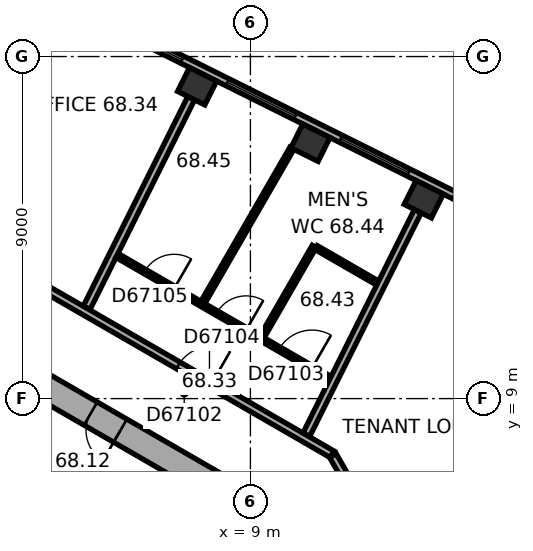
"""IFC4 building model, lengths in metres.
Left out: names, types, materials, properties, quantities, classifications, styles, units other than length and angle.
Written with IfcOpenShell. Run it as: python <this file> out.ifc"""

import sys

from ifc_helpers import new_model, si_unit, direction, frame, frame_2d, origin, origin_2d, place, context, subcontext, project, spatial, rectangle, extrude, element, fill, save


model = new_model("IFC4")
c1 = context("Model", 3, precision=1e-05, world=origin(), true_north=direction((0.0, 1.0)))
c2 = subcontext(c1, "Body", "Model", "MODEL_VIEW")
j1 = project(units=[si_unit("LENGTHUNIT", "METRE"), si_unit("PLANEANGLEUNIT", "RADIAN")], contexts=[c1])
p1 = place(None, origin())
s1 = spatial("IfcSite", under=j1, at=p1, CompositionType="ELEMENT")
p2 = place(p1, origin())
s2 = spatial("IfcBuilding", under=s1, at=p2, CompositionType="ELEMENT")
p3 = place(p2, frame((0.0, 0.0, 274.6)))
s3 = spatial("IfcBuildingStorey", under=s2, at=p3, CompositionType="ELEMENT", Elevation=274.6)
for number, where, z_axis, x_axis in (
    (1, (13.561, 14.246, 0.0), (0.0, 0.0, 1.0), (-0.895, 0.446, 0.0)),
    (2, (10.58, 15.732, 0.0), (0.0, 0.0, 1.0), (-0.895, 0.446, 0.0)),
    (3, (7.598, 17.219, 0.0), (0.0, 0.0, 1.0), (-0.895, 0.446, 0.0)),
):
    element("IfcColumn", number, at=place(p3, frame(where, z_axis=z_axis, x_axis=x_axis)), inside=s3, PredefinedType="COLUMN", context=c2, shape_type="SweptSolid", body=[
        extrude(rectangle(XDim=0.8, YDim=0.7, at=origin_2d()), origin(), (0.0, 0.0, 1.0), 3.7),
    ])
p4 = place(p3, frame((10.025, 5.586, 0.0), z_axis=(0.0, 0.0, 1.0), x_axis=(-0.866026453023, 0.499998182661, 0.0)))
e4 = element("IfcWall", 4, at=p4, inside=s3, PredefinedType="SHEAR", context=c2, shape_type="SweptSolid", body=[
    extrude(rectangle(XDim=11.778, YDim=0.7, at=frame_2d((5.889, 0.0))), origin(), (0.0, 0.0, 1.0), 3.7),
])
p5 = place(p4, frame((5.139, 0.0, 0.0)))
e5 = element("IfcOpeningElement", 5, at=p5, cuts=e4, PredefinedType="OPENING", context=c2, shape_type="SweptSolid", body=[
    extrude(rectangle(XDim=0.9, YDim=2.1, at=frame_2d((0.45, 1.05))), frame((0.0, 0.36, 0.0), z_axis=(0.0, -1.0, 0.0), x_axis=(1.0, 0.0, 0.0)), (0.0, 0.0, 1.0), 0.72),
])
p6 = place(p3, frame((17.223, 12.923, 0.0), z_axis=(0.0, 0.0, 1.0), x_axis=(-0.894930561148, 0.44620543556, 0.0)))
e6 = element("IfcWall", 6, at=p6, inside=s3, PredefinedType="STANDARD", context=c2, shape_type="SweptSolid", body=[
    extrude(rectangle(XDim=17.731, YDim=0.2, at=frame_2d((8.866, 0.0))), origin(), (0.0, 0.0, 1.0), 3.7),
])
p7 = place(p6, frame((1.202, 0.0, 0.9)))
e7 = element("IfcOpeningElement", 7, at=p7, cuts=e6, PredefinedType="OPENING", context=c2, shape_type="SweptSolid", body=[
    extrude(rectangle(XDim=2.0, YDim=2.0, at=frame_2d((1.0, 1.0))), frame((0.0, 0.11, 0.0), z_axis=(0.0, -1.0, 0.0), x_axis=(1.0, 0.0, 0.0)), (0.0, 0.0, 1.0), 0.22),
])
p8 = place(p6, frame((4.533, 0.0, 0.9)))
e8 = element("IfcOpeningElement", 8, at=p8, cuts=e6, PredefinedType="OPENING", context=c2, shape_type="SweptSolid", body=[
    extrude(rectangle(XDim=2.0, YDim=2.0, at=frame_2d((1.0, 1.0))), frame((0.0, 0.11, 0.0), z_axis=(0.0, -1.0, 0.0), x_axis=(1.0, 0.0, 0.0)), (0.0, 0.0, 1.0), 0.22),
])
p9 = place(p6, frame((7.865, 0.0, 0.9)))
e9 = element("IfcOpeningElement", 9, at=p9, cuts=e6, PredefinedType="OPENING", context=c2, shape_type="SweptSolid", body=[
    extrude(rectangle(XDim=2.0, YDim=2.0, at=frame_2d((1.0, 1.0))), frame((0.0, 0.11, 0.0), z_axis=(0.0, -1.0, 0.0), x_axis=(1.0, 0.0, 0.0)), (0.0, 0.0, 1.0), 0.22),
])
p10 = place(p6, frame((11.197, 0.0, 0.9)))
e10 = element("IfcOpeningElement", 10, at=p10, cuts=e6, PredefinedType="OPENING", context=c2, shape_type="SweptSolid", body=[
    extrude(rectangle(XDim=2.0, YDim=2.0, at=frame_2d((1.0, 1.0))), frame((0.0, 0.11, 0.0), z_axis=(0.0, -1.0, 0.0), x_axis=(1.0, 0.0, 0.0)), (0.0, 0.0, 1.0), 0.22),
])
p11 = place(p6, frame((14.528, 0.0, 0.9)))
e11 = element("IfcOpeningElement", 11, at=p11, cuts=e6, PredefinedType="OPENING", context=c2, shape_type="SweptSolid", body=[
    extrude(rectangle(XDim=2.0, YDim=2.0, at=frame_2d((1.0, 1.0))), frame((0.0, 0.11, 0.0), z_axis=(0.0, -1.0, 0.0), x_axis=(1.0, 0.0, 0.0)), (0.0, 0.0, 1.0), 0.22),
])
p12 = place(p3, frame((7.424, 4.259, 0.0), z_axis=(0.0, 0.0, 1.0), x_axis=(-0.866026010844, 0.49999894854, 0.0)))
e12 = element("IfcWall", 12, at=p12, inside=s3, PredefinedType="PARTITIONING", context=c2, shape_type="SweptSolid", body=[
    extrude(rectangle(XDim=8.0, YDim=0.2, at=frame_2d((4.0, 0.0))), origin(), (0.0, 0.0, 1.0), 3.35),
])
p13 = place(p3, frame((6.303, 4.617, 0.0), z_axis=(0.0, 0.0, 1.0), x_axis=(-0.866027801685, 0.499995846692, 0.0)))
e13 = element("IfcWall", 13, at=p13, inside=s3, PredefinedType="SHEAR", context=c2, shape_type="SweptSolid", body=[
    extrude(rectangle(XDim=7.06, YDim=0.3, at=frame_2d((3.53, 0.0))), origin(), (0.0, 0.0, 1.0), 3.35),
])
p14 = place(p3, frame((7.442, 16.906, 0.0), z_axis=(0.0, 0.0, 1.0), x_axis=(-0.446183401262, -0.894941546939, 0.0)))
e14 = element("IfcWall", 14, at=p14, inside=s3, PredefinedType="PARTITIONING", context=c2, shape_type="SweptSolid", body=[
    extrude(rectangle(XDim=6.163, YDim=0.2, at=frame_2d((3.082, 0.0))), origin(), (0.0, 0.0, 1.0), 3.35),
])
p15 = place(p3, frame((10.091, 15.585, 0.0), z_axis=(0.0, 0.0, 1.0), x_axis=(-0.499969186147, -0.86604319344, 0.0)))
e15 = element("IfcWall", 15, at=p15, inside=s3, PredefinedType="PARTITIONING", context=c2, shape_type="SweptSolid", body=[
    extrude(rectangle(XDim=4.682, YDim=0.12, at=frame_2d((2.341, 0.0))), origin(), (0.0, 0.0, 1.0), 2.65),
])
p16 = place(p3, frame((10.679, 13.003, 0.0), z_axis=(0.0, 0.0, 1.0), x_axis=(-0.500048966069, -0.865997131366, 0.0)))
e16 = element("IfcWall", 16, at=p16, inside=s3, PredefinedType="PARTITIONING", context=c2, shape_type="SweptSolid", body=[
    extrude(rectangle(XDim=2.74, YDim=0.12, at=frame_2d((1.37, 0.0))), origin(), (0.0, 0.0, 1.0), 3.35),
])
p17 = place(p3, frame((11.097, 9.528, 0.0), z_axis=(0.0, 0.0, 1.0), x_axis=(-0.866039938485, 0.499974824316, 0.0)))
e17 = element("IfcWall", 17, at=p17, inside=s3, PredefinedType="PARTITIONING", context=c2, shape_type="SweptSolid", body=[
    extrude(rectangle(XDim=6.476, YDim=0.12, at=frame_2d((3.238, 0.0))), origin(), (0.0, 0.0, 1.0), 3.35),
])
p18 = place(p17, frame((0.55, 0.0, 0.0)))
e18 = element("IfcOpeningElement", 18, at=p18, cuts=e17, PredefinedType="OPENING", context=c2, shape_type="SweptSolid", body=[
    extrude(rectangle(XDim=1.0, YDim=2.1, at=frame_2d((0.5, 1.05))), frame((0.0, 0.07, 0.0), z_axis=(0.0, -1.0, 0.0), x_axis=(1.0, 0.0, 0.0)), (0.0, 0.0, 1.0), 0.14),
])
p19 = place(p17, frame((2.55, 0.0, 0.0)))
e19 = element("IfcOpeningElement", 19, at=p19, cuts=e17, PredefinedType="OPENING", context=c2, shape_type="SweptSolid", body=[
    extrude(rectangle(XDim=0.9, YDim=2.1, at=frame_2d((0.45, 1.05))), frame((0.0, 0.07, 0.0), z_axis=(0.0, -1.0, 0.0), x_axis=(1.0, 0.0, 0.0)), (0.0, 0.0, 1.0), 0.14),
])
p20 = place(p17, frame((4.738, 0.0, 0.0)))
e20 = element("IfcOpeningElement", 20, at=p20, cuts=e17, PredefinedType="OPENING", context=c2, shape_type="SweptSolid", body=[
    extrude(rectangle(XDim=0.9, YDim=2.1, at=frame_2d((0.45, 1.05))), frame((0.0, 0.07, 0.0), z_axis=(0.0, -1.0, 0.0), x_axis=(1.0, 0.0, 0.0)), (0.0, 0.0, 1.0), 0.14),
])
p21 = place(p3, frame((11.15, 7.534, 0.0), z_axis=(0.0, 0.0, 1.0), x_axis=(-0.866026603062, 0.499997922785, 0.0)))
e21 = element("IfcWall", 21, at=p21, inside=s3, PredefinedType="PARTITIONING", context=c2, shape_type="SweptSolid", body=[
    extrude(rectangle(XDim=11.738, YDim=0.2, at=frame_2d((5.869, 0.0))), origin(), (0.0, 0.0, 1.0), 3.35),
])
p22 = place(p21, frame((3.676, 0.0, 0.0)))
e22 = element("IfcOpeningElement", 22, at=p22, cuts=e21, PredefinedType="OPENING", context=c2, shape_type="SweptSolid", body=[
    extrude(rectangle(XDim=1.0, YDim=2.1, at=frame_2d((0.5, 1.05))), frame((0.0, 0.11, 0.0), z_axis=(0.0, -1.0, 0.0), x_axis=(1.0, 0.0, 0.0)), (0.0, 0.0, 1.0), 0.22),
])
p23 = place(p3, frame((12.08, 5.924, 0.0), z_axis=(0.0, 0.0, 1.0), x_axis=(-0.500004960326, 0.86602253992, 0.0)))
e23 = element("IfcWall", 23, at=p23, inside=s3, PredefinedType="PARTITIONING", context=c2, shape_type="SweptSolid", body=[
    extrude(rectangle(XDim=1.82, YDim=0.2, at=frame_2d((0.91, 0.0))), origin(), (0.0, 0.0, 1.0), 3.35),
])
p24 = place(p3, frame((12.349, 12.038, 0.0), z_axis=(0.0, 0.0, 1.0), x_axis=(-0.866039825209, 0.499975020527, 0.0)))
e24 = element("IfcWall", 24, at=p24, inside=s3, PredefinedType="PARTITIONING", context=c2, shape_type="SweptSolid", body=[
    extrude(rectangle(XDim=1.869, YDim=0.12, at=frame_2d((0.934, 0.0))), origin(), (0.0, 0.0, 1.0), 3.35),
])
p25 = place(p3, frame((13.405, 13.933, 0.0), z_axis=(0.0, 0.0, 1.0), x_axis=(-0.446187838644, -0.894939334618, 0.0)))
e25 = element("IfcWall", 25, at=p25, inside=s3, PredefinedType="PARTITIONING", context=c2, shape_type="SweptSolid", body=[
    extrude(rectangle(XDim=6.571, YDim=0.2, at=frame_2d((3.286, 0.0))), origin(), (0.0, 0.0, 1.0), 3.35),
])
p26 = place(p8, origin())
e26 = element("IfcWindow", 26, at=p26, inside=s3, PartitioningType="SINGLE_PANEL", PredefinedType="WINDOW", context=c2, shape_type="SweptSolid", body=[
    extrude(rectangle(XDim=2.0, YDim=2.0, at=frame_2d((1.0, 1.0))), frame((0.0, 0.03, 0.0), z_axis=(0.0, -1.0, 0.0), x_axis=(1.0, 0.0, 0.0)), (0.0, 0.0, 1.0), 0.06),
])
fill(e8, e26)
p27 = place(p9, origin())
e27 = element("IfcWindow", 27, at=p27, inside=s3, PartitioningType="SINGLE_PANEL", PredefinedType="WINDOW", context=c2, shape_type="SweptSolid", body=[
    extrude(rectangle(XDim=2.0, YDim=2.0, at=frame_2d((1.0, 1.0))), frame((0.0, 0.03, 0.0), z_axis=(0.0, -1.0, 0.0), x_axis=(1.0, 0.0, 0.0)), (0.0, 0.0, 1.0), 0.06),
])
fill(e9, e27)
p28 = place(p10, origin())
e28 = element("IfcWindow", 28, at=p28, inside=s3, PartitioningType="SINGLE_PANEL", PredefinedType="WINDOW", context=c2, shape_type="SweptSolid", body=[
    extrude(rectangle(XDim=2.0, YDim=2.0, at=frame_2d((1.0, 1.0))), frame((0.0, 0.03, 0.0), z_axis=(0.0, -1.0, 0.0), x_axis=(1.0, 0.0, 0.0)), (0.0, 0.0, 1.0), 0.06),
])
fill(e10, e28)
p29 = place(p5, origin())
e29 = element("IfcDoor", 29, at=p29, inside=s3, OperationType="SINGLE_SWING_LEFT", PredefinedType="DOOR", context=c2, shape_type="SweptSolid", body=[
    extrude(rectangle(XDim=0.9, YDim=2.1, at=frame_2d((0.45, 1.05))), frame((0.0, 0.025, 0.0), z_axis=(0.0, -1.0, 0.0), x_axis=(1.0, 0.0, 0.0)), (0.0, 0.0, 1.0), 0.05),
])
fill(e5, e29)
p30 = place(p22, origin())
e30 = element("IfcDoor", 30, at=p30, inside=s3, OperationType="SINGLE_SWING_LEFT", PredefinedType="DOOR", context=c2, shape_type="SweptSolid", body=[
    extrude(rectangle(XDim=1.0, YDim=2.1, at=frame_2d((0.5, 1.05))), frame((0.0, 0.025, 0.0), z_axis=(0.0, -1.0, 0.0), x_axis=(1.0, 0.0, 0.0)), (0.0, 0.0, 1.0), 0.05),
])
fill(e22, e30)
p31 = place(p18, origin())
e31 = element("IfcDoor", 31, at=p31, inside=s3, OperationType="SINGLE_SWING_LEFT", PredefinedType="DOOR", context=c2, shape_type="SweptSolid", body=[
    extrude(rectangle(XDim=1.0, YDim=2.1, at=frame_2d((0.5, 1.05))), frame((0.0, 0.025, 0.0), z_axis=(0.0, -1.0, 0.0), x_axis=(1.0, 0.0, 0.0)), (0.0, 0.0, 1.0), 0.05),
])
fill(e18, e31)
p32 = place(p19, origin())
e32 = element("IfcDoor", 32, at=p32, inside=s3, OperationType="SINGLE_SWING_LEFT", PredefinedType="DOOR", context=c2, shape_type="SweptSolid", body=[
    extrude(rectangle(XDim=0.9, YDim=2.1, at=frame_2d((0.45, 1.05))), frame((0.0, 0.025, 0.0), z_axis=(0.0, -1.0, 0.0), x_axis=(1.0, 0.0, 0.0)), (0.0, 0.0, 1.0), 0.05),
])
fill(e19, e32)
p33 = place(p20, origin())
e33 = element("IfcDoor", 33, at=p33, inside=s3, OperationType="SINGLE_SWING_LEFT", PredefinedType="DOOR", context=c2, shape_type="SweptSolid", body=[
    extrude(rectangle(XDim=0.9, YDim=2.1, at=frame_2d((0.45, 1.05))), frame((0.0, 0.025, 0.0), z_axis=(0.0, -1.0, 0.0), x_axis=(1.0, 0.0, 0.0)), (0.0, 0.0, 1.0), 0.05),
])
fill(e20, e33)
save(model, sys.argv[1])
